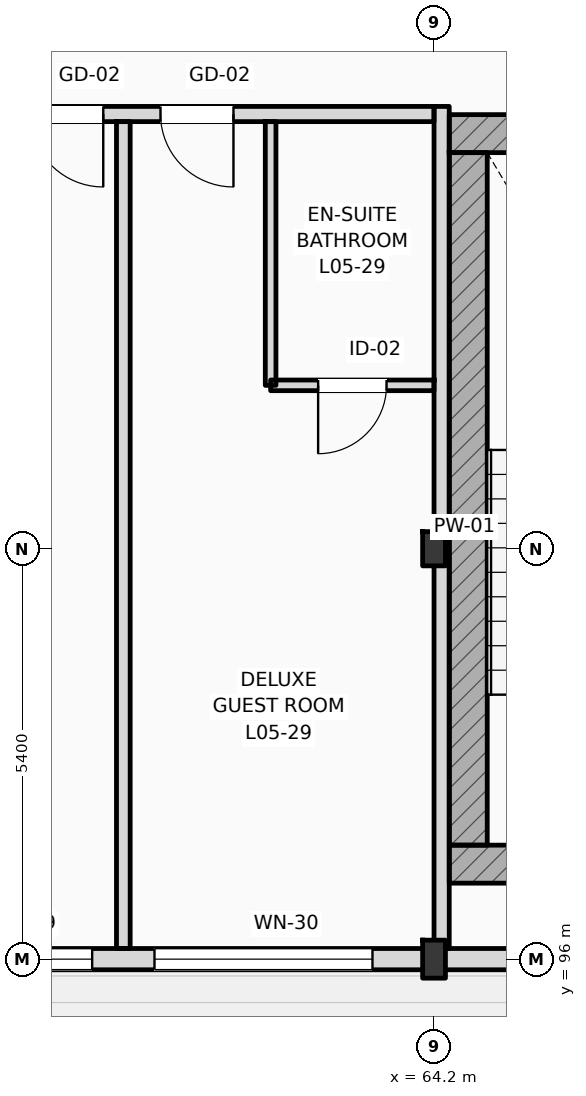
"""IFC4 building model, lengths in metres.
Left out: names, types, materials, properties, quantities, classifications, styles, units other than length and angle.
Written with IfcOpenShell. Run it as: python <this file> out.ifc"""

import sys

from ifc_helpers import new_model, si_unit, direction, frame, frame_2d, origin, origin_2d, place, context, subcontext, project, spatial, rectangle, i_section, extrude, element, fill, save


model = new_model("IFC4")
c1 = context("Model", 3, precision=1e-05, world=origin(), true_north=direction((0.0, 1.0)))
c2 = subcontext(c1, "Body", "Model", "MODEL_VIEW")
j1 = project(units=[si_unit("LENGTHUNIT", "METRE"), si_unit("PLANEANGLEUNIT", "RADIAN")], contexts=[c1])
p1 = place(None, origin())
s1 = spatial("IfcSite", under=j1, at=p1, CompositionType="ELEMENT")
p2 = place(p1, origin())
s2 = spatial("IfcBuilding", under=s1, at=p2, CompositionType="ELEMENT")
p3 = place(p2, frame((0.0, 0.0, 24.6)))
s3 = spatial("IfcBuildingStorey", under=s2, at=p3, CompositionType="ELEMENT", Elevation=24.6)
p4 = place(p3, frame((64.2, 96.0, 0.0), z_axis=(0.0, 0.0, 1.0), x_axis=(1.0, 0.0, 0.0)))
e1 = element("IfcColumn", 1, at=p4, inside=s3, PredefinedType="COLUMN", context=c2, shape_type="SweptSolid", body=[
    extrude(i_section(OverallWidth=0.3, OverallDepth=0.5, WebThickness=0.014, FlangeThickness=0.028, FilletRadius=0.027, at=origin_2d()), origin(), (0.0, 0.0, 1.0), 3.6),
])
p5 = place(p3, frame((64.2, 101.4, 0.0), z_axis=(0.0, 0.0, 1.0), x_axis=(1.0, 0.0, 0.0)))
e2 = element("IfcColumn", 2, at=p5, inside=s3, PredefinedType="COLUMN", context=c2, shape_type="SweptSolid", body=[
    extrude(i_section(OverallWidth=0.3, OverallDepth=0.45, WebThickness=0.014, FlangeThickness=0.026, FilletRadius=0.027, at=origin_2d()), origin(), (0.0, 0.0, 1.0), 3.6),
])
for number, where, z_axis, x_axis in (
    (3, (64.4, 106.862, 0.0), (0.0, 0.0, 1.0), (1.0, 0.0, 0.0)),
    (4, (64.4, 97.25, 0.0), (0.0, 0.0, 1.0), (1.0, 0.0, 0.0)),
):
    element("IfcWall", number, at=place(p3, frame(where, z_axis=z_axis, x_axis=x_axis)), inside=s3, PredefinedType="SHEAR", context=c2, shape_type="SweptSolid", body=[
        extrude(rectangle(XDim=5.16, YDim=0.5, at=frame_2d((2.58, 0.0))), origin(), (0.0, 0.0, 1.0), 3.6),
    ])
p6 = place(p3, frame((64.65, 97.5, 0.0), z_axis=(0.0, 0.0, 1.0), x_axis=(0.0, 1.0, 0.0)))
e5 = element("IfcWall", 5, at=p6, inside=s3, PredefinedType="SHEAR", context=c2, shape_type="SweptSolid", body=[
    extrude(rectangle(XDim=9.112, YDim=0.5, at=frame_2d((4.556, 0.0))), origin(), (0.0, 0.0, 1.0), 3.6),
])
p7 = place(p3, frame((25.2, 96.0, 0.0), z_axis=(0.0, 0.0, 1.0), x_axis=(1.0, 0.0, 0.0)))
e6 = element("IfcWall", 6, at=p7, inside=s3, PredefinedType="STANDARD", context=c2, shape_type="SweptSolid", body=[
    extrude(rectangle(XDim=94.8, YDim=0.28, at=frame_2d((47.4, 0.0))), origin(), (0.0, 0.0, 1.0), 2.78),
])
p8 = place(p7, frame((16.539, 0.0, 0.9)))
e7 = element("IfcOpeningElement", 7, at=p8, cuts=e6, PredefinedType="OPENING", context=c2, shape_type="SweptSolid", body=[
    extrude(rectangle(XDim=1.75, YDim=1.7, at=frame_2d((0.875, 0.85))), frame((0.0, 0.15, 0.0), z_axis=(0.0, -1.0, 0.0), x_axis=(1.0, 0.0, 0.0)), (0.0, 0.0, 1.0), 0.3),
])
p9 = place(p7, frame((20.367, 0.0, 0.9)))
e8 = element("IfcOpeningElement", 8, at=p9, cuts=e6, PredefinedType="OPENING", context=c2, shape_type="SweptSolid", body=[
    extrude(rectangle(XDim=2.0, YDim=1.7, at=frame_2d((1.0, 0.85))), frame((0.0, 0.15, 0.0), z_axis=(0.0, -1.0, 0.0), x_axis=(1.0, 0.0, 0.0)), (0.0, 0.0, 1.0), 0.3),
])
p10 = place(p7, frame((24.326, 0.0, 0.9)))
e9 = element("IfcOpeningElement", 9, at=p10, cuts=e6, PredefinedType="OPENING", context=c2, shape_type="SweptSolid", body=[
    extrude(rectangle(XDim=2.3, YDim=1.7, at=frame_2d((1.15, 0.85))), frame((0.0, 0.15, 0.0), z_axis=(0.0, -1.0, 0.0), x_axis=(1.0, 0.0, 0.0)), (0.0, 0.0, 1.0), 0.3),
])
p11 = place(p7, frame((27.684, 0.0, 0.9)))
e10 = element("IfcOpeningElement", 10, at=p11, cuts=e6, PredefinedType="OPENING", context=c2, shape_type="SweptSolid", body=[
    extrude(rectangle(XDim=2.6, YDim=1.7, at=frame_2d((1.3, 0.85))), frame((0.0, 0.15, 0.0), z_axis=(0.0, -1.0, 0.0), x_axis=(1.0, 0.0, 0.0)), (0.0, 0.0, 1.0), 0.3),
])
p12 = place(p7, frame((32.083, 0.0, 0.9)))
e11 = element("IfcOpeningElement", 11, at=p12, cuts=e6, PredefinedType="OPENING", context=c2, shape_type="SweptSolid", body=[
    extrude(rectangle(XDim=2.419, YDim=1.7, at=frame_2d((1.209, 0.85))), frame((0.0, 0.15, 0.0), z_axis=(0.0, -1.0, 0.0), x_axis=(1.0, 0.0, 0.0)), (0.0, 0.0, 1.0), 0.3),
])
p13 = place(p7, frame((35.322, 0.0, 0.9)))
e12 = element("IfcOpeningElement", 12, at=p13, cuts=e6, PredefinedType="OPENING", context=c2, shape_type="SweptSolid", body=[
    extrude(rectangle(XDim=2.868, YDim=1.7, at=frame_2d((1.434, 0.85))), frame((0.0, 0.15, 0.0), z_axis=(0.0, -1.0, 0.0), x_axis=(1.0, 0.0, 0.0)), (0.0, 0.0, 1.0), 0.3),
])
p14 = place(p7, frame((56.015, 0.0, 0.9)))
e13 = element("IfcOpeningElement", 13, at=p14, cuts=e6, PredefinedType="OPENING", context=c2, shape_type="SweptSolid", body=[
    extrude(rectangle(XDim=1.2, YDim=1.7, at=frame_2d((0.6, 0.85))), frame((0.0, 0.15, 0.0), z_axis=(0.0, -1.0, 0.0), x_axis=(1.0, 0.0, 0.0)), (0.0, 0.0, 1.0), 0.3),
])
p15 = place(p7, frame((59.888, 0.0, 0.9)))
e14 = element("IfcOpeningElement", 14, at=p15, cuts=e6, PredefinedType="OPENING", context=c2, shape_type="SweptSolid", body=[
    extrude(rectangle(XDim=1.35, YDim=1.7, at=frame_2d((0.675, 0.85))), frame((0.0, 0.15, 0.0), z_axis=(0.0, -1.0, 0.0), x_axis=(1.0, 0.0, 0.0)), (0.0, 0.0, 1.0), 0.3),
])
p16 = place(p7, frame((63.799, 0.0, 0.9)))
e15 = element("IfcOpeningElement", 15, at=p16, cuts=e6, PredefinedType="OPENING", context=c2, shape_type="SweptSolid", body=[
    extrude(rectangle(XDim=1.5, YDim=1.7, at=frame_2d((0.75, 0.85))), frame((0.0, 0.15, 0.0), z_axis=(0.0, -1.0, 0.0), x_axis=(1.0, 0.0, 0.0)), (0.0, 0.0, 1.0), 0.3),
])
p17 = place(p7, frame((67.709, 0.0, 0.9)))
e16 = element("IfcOpeningElement", 16, at=p17, cuts=e6, PredefinedType="OPENING", context=c2, shape_type="SweptSolid", body=[
    extrude(rectangle(XDim=1.65, YDim=1.7, at=frame_2d((0.825, 0.85))), frame((0.0, 0.15, 0.0), z_axis=(0.0, -1.0, 0.0), x_axis=(1.0, 0.0, 0.0)), (0.0, 0.0, 1.0), 0.3),
])
p18 = place(p7, frame((71.618, 0.0, 0.9)))
e17 = element("IfcOpeningElement", 17, at=p18, cuts=e6, PredefinedType="OPENING", context=c2, shape_type="SweptSolid", body=[
    extrude(rectangle(XDim=1.8, YDim=1.7, at=frame_2d((0.9, 0.85))), frame((0.0, 0.15, 0.0), z_axis=(0.0, -1.0, 0.0), x_axis=(1.0, 0.0, 0.0)), (0.0, 0.0, 1.0), 0.3),
])
p19 = place(p7, frame((75.129, 0.0, 0.9)))
e18 = element("IfcOpeningElement", 18, at=p19, cuts=e6, PredefinedType="OPENING", context=c2, shape_type="SweptSolid", body=[
    extrude(rectangle(XDim=1.95, YDim=1.7, at=frame_2d((0.975, 0.85))), frame((0.0, 0.15, 0.0), z_axis=(0.0, -1.0, 0.0), x_axis=(1.0, 0.0, 0.0)), (0.0, 0.0, 1.0), 0.3),
])
p20 = place(p7, frame((79.439, 0.0, 0.9)))
e19 = element("IfcOpeningElement", 19, at=p20, cuts=e6, PredefinedType="OPENING", context=c2, shape_type="SweptSolid", body=[
    extrude(rectangle(XDim=2.1, YDim=1.7, at=frame_2d((1.05, 0.85))), frame((0.0, 0.15, 0.0), z_axis=(0.0, -1.0, 0.0), x_axis=(1.0, 0.0, 0.0)), (0.0, 0.0, 1.0), 0.3),
])
p21 = place(p7, frame((83.349, 0.0, 0.9)))
e20 = element("IfcOpeningElement", 20, at=p21, cuts=e6, PredefinedType="OPENING", context=c2, shape_type="SweptSolid", body=[
    extrude(rectangle(XDim=2.25, YDim=1.7, at=frame_2d((1.125, 0.85))), frame((0.0, 0.15, 0.0), z_axis=(0.0, -1.0, 0.0), x_axis=(1.0, 0.0, 0.0)), (0.0, 0.0, 1.0), 0.3),
])
p22 = place(p7, frame((87.258, 0.0, 0.9)))
e21 = element("IfcOpeningElement", 21, at=p22, cuts=e6, PredefinedType="OPENING", context=c2, shape_type="SweptSolid", body=[
    extrude(rectangle(XDim=2.4, YDim=1.7, at=frame_2d((1.2, 0.85))), frame((0.0, 0.15, 0.0), z_axis=(0.0, -1.0, 0.0), x_axis=(1.0, 0.0, 0.0)), (0.0, 0.0, 1.0), 0.3),
])
p23 = place(p7, frame((91.204, 0.0, 0.9)))
e22 = element("IfcOpeningElement", 22, at=p23, cuts=e6, PredefinedType="OPENING", context=c2, shape_type="SweptSolid", body=[
    extrude(rectangle(XDim=2.55, YDim=1.7, at=frame_2d((1.275, 0.85))), frame((0.0, 0.15, 0.0), z_axis=(0.0, -1.0, 0.0), x_axis=(1.0, 0.0, 0.0)), (0.0, 0.0, 1.0), 0.3),
])
p24 = place(p3, frame((40.76, 107.12, 0.0), z_axis=(0.0, 0.0, 1.0), x_axis=(1.0, 0.0, 0.0)))
e23 = element("IfcWall", 23, at=p24, inside=s3, PredefinedType="PARTITIONING", context=c2, shape_type="SweptSolid", body=[
    extrude(rectangle(XDim=23.44, YDim=0.2, at=frame_2d((11.72, 0.0))), origin(), (0.0, 0.0, 1.0), 3.34),
])
p25 = place(p24, frame((2.449, 0.0, 0.0)))
e24 = element("IfcOpeningElement", 24, at=p25, cuts=e23, PredefinedType="OPENING", context=c2, shape_type="SweptSolid", body=[
    extrude(rectangle(XDim=0.96, YDim=2.2, at=frame_2d((0.48, 1.1))), frame((0.0, 0.11, 0.0), z_axis=(0.0, -1.0, 0.0), x_axis=(1.0, 0.0, 0.0)), (0.0, 0.0, 1.0), 0.22),
])
p26 = place(p24, frame((4.253, 0.0, 0.0)))
e25 = element("IfcOpeningElement", 25, at=p26, cuts=e23, PredefinedType="OPENING", context=c2, shape_type="SweptSolid", body=[
    extrude(rectangle(XDim=0.96, YDim=2.2, at=frame_2d((0.48, 1.1))), frame((0.0, 0.11, 0.0), z_axis=(0.0, -1.0, 0.0), x_axis=(1.0, 0.0, 0.0)), (0.0, 0.0, 1.0), 0.22),
])
p27 = place(p24, frame((10.311, 0.0, 0.0)))
e26 = element("IfcOpeningElement", 26, at=p27, cuts=e23, PredefinedType="OPENING", context=c2, shape_type="SweptSolid", body=[
    extrude(rectangle(XDim=0.96, YDim=2.2, at=frame_2d((0.48, 1.1))), frame((0.0, 0.11, 0.0), z_axis=(0.0, -1.0, 0.0), x_axis=(1.0, 0.0, 0.0)), (0.0, 0.0, 1.0), 0.22),
])
p28 = place(p24, frame((12.069, 0.0, 0.0)))
e27 = element("IfcOpeningElement", 27, at=p28, cuts=e23, PredefinedType="OPENING", context=c2, shape_type="SweptSolid", body=[
    extrude(rectangle(XDim=0.96, YDim=2.2, at=frame_2d((0.48, 1.1))), frame((0.0, 0.11, 0.0), z_axis=(0.0, -1.0, 0.0), x_axis=(1.0, 0.0, 0.0)), (0.0, 0.0, 1.0), 0.22),
])
p29 = place(p24, frame((18.128, 0.0, 0.0)))
e28 = element("IfcOpeningElement", 28, at=p29, cuts=e23, PredefinedType="OPENING", context=c2, shape_type="SweptSolid", body=[
    extrude(rectangle(XDim=0.96, YDim=2.2, at=frame_2d((0.48, 1.1))), frame((0.0, 0.11, 0.0), z_axis=(0.0, -1.0, 0.0), x_axis=(1.0, 0.0, 0.0)), (0.0, 0.0, 1.0), 0.22),
])
p30 = place(p24, frame((19.841, 0.0, 0.0)))
e29 = element("IfcOpeningElement", 29, at=p30, cuts=e23, PredefinedType="OPENING", context=c2, shape_type="SweptSolid", body=[
    extrude(rectangle(XDim=0.96, YDim=2.2, at=frame_2d((0.48, 1.1))), frame((0.0, 0.11, 0.0), z_axis=(0.0, -1.0, 0.0), x_axis=(1.0, 0.0, 0.0)), (0.0, 0.0, 1.0), 0.22),
])
p31 = place(p3, frame((64.3, 96.14, 0.0), z_axis=(0.0, 0.0, 1.0), x_axis=(0.0, 1.0, 0.0)))
e30 = element("IfcWall", 30, at=p31, inside=s3, PredefinedType="PARTITIONING", context=c2, shape_type="SweptSolid", body=[
    extrude(rectangle(XDim=11.08, YDim=0.2, at=frame_2d((5.54, 0.0))), origin(), (0.0, 0.0, 1.0), 2.93),
])
p32 = place(p3, frame((60.112, 96.14, 0.0), z_axis=(0.0, 0.0, 1.0), x_axis=(0.0, 1.0, 0.0)))
e31 = element("IfcWall", 31, at=p32, inside=s3, PredefinedType="PARTITIONING", context=c2, shape_type="SweptSolid", body=[
    extrude(rectangle(XDim=10.88, YDim=0.18, at=frame_2d((5.44, 0.0))), origin(), (0.0, 0.0, 1.0), 3.34),
])
p33 = place(p3, frame((62.05, 103.55, 0.0), z_axis=(0.0, 0.0, 1.0), x_axis=(0.0, 1.0, 0.0)))
e32 = element("IfcWall", 32, at=p33, inside=s3, PredefinedType="PARTITIONING", context=c2, shape_type="SweptSolid", body=[
    extrude(rectangle(XDim=3.47, YDim=0.14, at=frame_2d((1.735, 0.0))), origin(), (0.0, 0.0, 1.0), 3.34),
])
p34 = place(p3, frame((62.05, 103.55, 0.0), z_axis=(0.0, 0.0, 1.0), x_axis=(1.0, 0.0, 0.0)))
e33 = element("IfcWall", 33, at=p34, inside=s3, PredefinedType="PARTITIONING", context=c2, shape_type="SweptSolid", body=[
    extrude(rectangle(XDim=2.15, YDim=0.14, at=frame_2d((1.075, 0.0))), origin(), (0.0, 0.0, 1.0), 3.34),
])
p35 = place(p34, frame((0.625, 0.0, 0.0)))
e34 = element("IfcOpeningElement", 34, at=p35, cuts=e33, PredefinedType="OPENING", context=c2, shape_type="SweptSolid", body=[
    extrude(rectangle(XDim=0.9, YDim=2.1, at=frame_2d((0.45, 1.05))), frame((0.0, 0.08, 0.0), z_axis=(0.0, -1.0, 0.0), x_axis=(1.0, 0.0, 0.0)), (0.0, 0.0, 1.0), 0.16),
])
p36 = place(p12, origin())
e35 = element("IfcWindow", 35, at=p36, inside=s3, PartitioningType="DOUBLE_PANEL_VERTICAL", PredefinedType="WINDOW", context=c2, shape_type="SweptSolid", body=[
    extrude(rectangle(XDim=2.419, YDim=1.7, at=frame_2d((1.209, 0.85))), frame((0.0, 0.03, 0.0), z_axis=(0.0, -1.0, 0.0), x_axis=(1.0, 0.0, 0.0)), (0.0, 0.0, 1.0), 0.06),
])
fill(e11, e35)
p37 = place(p13, origin())
e36 = element("IfcWindow", 36, at=p37, inside=s3, PartitioningType="DOUBLE_PANEL_VERTICAL", PredefinedType="WINDOW", context=c2, shape_type="SweptSolid", body=[
    extrude(rectangle(XDim=2.868, YDim=1.7, at=frame_2d((1.434, 0.85))), frame((0.0, 0.03, 0.0), z_axis=(0.0, -1.0, 0.0), x_axis=(1.0, 0.0, 0.0)), (0.0, 0.0, 1.0), 0.06),
])
fill(e12, e36)
p38 = place(p29, frame((0.96, 0.0, 0.0), z_axis=(0.0, 0.0, 1.0), x_axis=(-1.0, 0.0, 0.0)))
e37 = element("IfcDoor", 37, at=p38, inside=s3, OperationType="SINGLE_SWING_RIGHT", PredefinedType="DOOR", context=c2, shape_type="SweptSolid", body=[
    extrude(rectangle(XDim=0.96, YDim=2.2, at=frame_2d((0.48, 1.1))), frame((0.0, 0.025, 0.0), z_axis=(0.0, -1.0, 0.0), x_axis=(1.0, 0.0, 0.0)), (0.0, 0.0, 1.0), 0.05),
])
fill(e28, e37)
p39 = place(p30, frame((0.96, 0.0, 0.0), z_axis=(0.0, 0.0, 1.0), x_axis=(-1.0, 0.0, 0.0)))
e38 = element("IfcDoor", 38, at=p39, inside=s3, OperationType="SINGLE_SWING_RIGHT", PredefinedType="DOOR", context=c2, shape_type="SweptSolid", body=[
    extrude(rectangle(XDim=0.96, YDim=2.2, at=frame_2d((0.48, 1.1))), frame((0.0, 0.025, 0.0), z_axis=(0.0, -1.0, 0.0), x_axis=(1.0, 0.0, 0.0)), (0.0, 0.0, 1.0), 0.05),
])
fill(e29, e38)
p40 = place(p35, frame((0.9, 0.0, 0.0), z_axis=(0.0, 0.0, 1.0), x_axis=(-1.0, 0.0, 0.0)))
e39 = element("IfcDoor", 39, at=p40, inside=s3, OperationType="SINGLE_SWING_LEFT", PredefinedType="DOOR", context=c2, shape_type="SweptSolid", body=[
    extrude(rectangle(XDim=0.9, YDim=2.1, at=frame_2d((0.45, 1.05))), frame((0.0, 0.025, 0.0), z_axis=(0.0, -1.0, 0.0), x_axis=(1.0, 0.0, 0.0)), (0.0, 0.0, 1.0), 0.05),
])
fill(e34, e39)
save(model, sys.argv[1])
